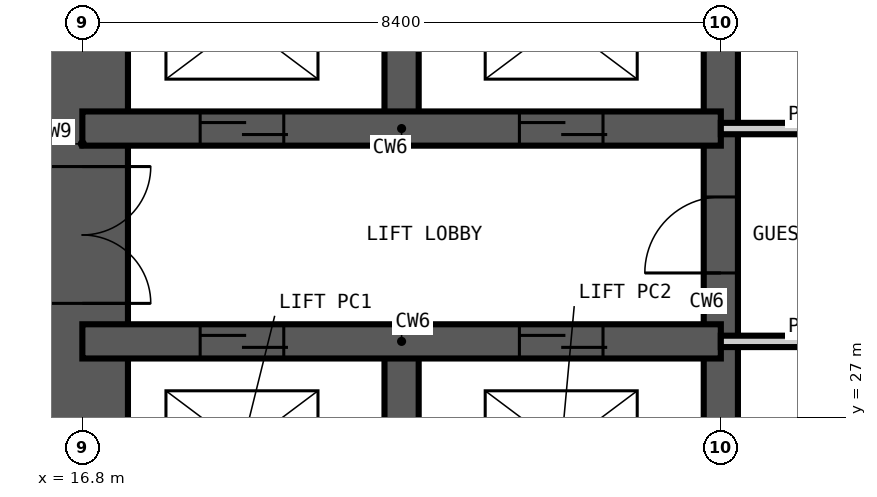
"""IFC4 building model, lengths in metres.
Left out: names, types, materials, properties, quantities, classifications, styles, units other than length and angle.
Written with IfcOpenShell. Run it as: python <this file> out.ifc"""

import sys

from ifc_helpers import new_model, si_unit, direction, frame, frame_2d, origin, place, context, subcontext, project, spatial, rectangle, extrude, element, fill, save


model = new_model("IFC4")
c1 = context("Model", 3, precision=1e-05, world=origin(), true_north=direction((0.0, 1.0)))
c2 = subcontext(c1, "Body", "Model", "MODEL_VIEW")
j1 = project(units=[si_unit("LENGTHUNIT", "METRE"), si_unit("PLANEANGLEUNIT", "RADIAN")], contexts=[c1])
p1 = place(None, origin())
s1 = spatial("IfcSite", under=j1, at=p1, CompositionType="ELEMENT")
p2 = place(p1, origin())
s2 = spatial("IfcBuilding", under=s1, at=p2, CompositionType="ELEMENT")
p3 = place(p2, frame((0.0, 0.0, 97.2)))
s3 = spatial("IfcBuildingStorey", under=s2, at=p3, CompositionType="ELEMENT", Elevation=97.2)
p4 = place(p3, frame((16.8, 41.4, -0.35), z_axis=(0.0, 0.0, 1.0), x_axis=(0.0, -1.0, 0.0)))
e1 = element("IfcWall", 1, at=p4, inside=s3, PredefinedType="SHEAR", context=c2, shape_type="SweptSolid", body=[
    extrude(rectangle(XDim=24.0, YDim=1.2, at=frame_2d((12.0, 0.0))), origin(), (0.0, 0.0, 1.0), 3.6),
])
p5 = place(p4, frame((11.1, 0.0, 0.35)))
e2 = element("IfcOpeningElement", 2, at=p5, cuts=e1, PredefinedType="OPENING", context=c2, shape_type="SweptSolid", body=[
    extrude(rectangle(XDim=1.8, YDim=2.2, at=frame_2d((0.9, 1.1))), frame((0.0, 0.61, 0.0), z_axis=(0.0, -1.0, 0.0), x_axis=(1.0, 0.0, 0.0)), (0.0, 0.0, 1.0), 1.22),
])
p6 = place(p4, frame((19.9, 0.0, 0.35)))
e3 = element("IfcOpeningElement", 3, at=p6, cuts=e1, PredefinedType="OPENING", context=c2, shape_type="SweptSolid", body=[
    extrude(rectangle(XDim=1.0, YDim=2.1, at=frame_2d((0.5, 1.05))), frame((0.0, 0.61, 0.0), z_axis=(0.0, -1.0, 0.0), x_axis=(1.0, 0.0, 0.0)), (0.0, 0.0, 1.0), 1.22),
])
p7 = place(p4, frame((5.2, 0.0, 0.35)))
e4 = element("IfcOpeningElement", 4, at=p7, cuts=e1, PredefinedType="OPENING", context=c2, shape_type="SweptSolid", body=[
    extrude(rectangle(XDim=1.0, YDim=2.1, at=frame_2d((0.5, 1.05))), frame((0.0, 0.61, 0.0), z_axis=(0.0, -1.0, 0.0), x_axis=(1.0, 0.0, 0.0)), (0.0, 0.0, 1.0), 1.22),
])
p8 = place(p3, frame((21.0, 22.4, -0.35), z_axis=(0.0, 0.0, 1.0), x_axis=(0.0, 1.0, 0.0)))
e5 = element("IfcWall", 5, at=p8, inside=s3, PredefinedType="SHEAR", context=c2, shape_type="SweptSolid", body=[
    extrude(rectangle(XDim=5.6, YDim=0.45, at=frame_2d((2.8, 0.0))), origin(), (0.0, 0.0, 1.0), 3.6),
])
p9 = place(p3, frame((21.0, 30.8, -0.35), z_axis=(0.0, 0.0, 1.0), x_axis=(0.0, 1.0, 0.0)))
e6 = element("IfcWall", 6, at=p9, inside=s3, PredefinedType="SHEAR", context=c2, shape_type="SweptSolid", body=[
    extrude(rectangle(XDim=2.8, YDim=0.45, at=frame_2d((1.4, 0.0))), origin(), (0.0, 0.0, 1.0), 3.6),
])
p10 = place(p3, frame((25.2, 16.8, -0.35), z_axis=(0.0, 0.0, 1.0), x_axis=(0.0, 1.0, 0.0)))
e7 = element("IfcWall", 7, at=p10, inside=s3, PredefinedType="SHEAR", context=c2, shape_type="SweptSolid", body=[
    extrude(rectangle(XDim=25.2, YDim=0.45, at=frame_2d((12.6, 0.0))), origin(), (0.0, 0.0, 1.0), 3.6),
])
p11 = place(p10, frame((12.1, 0.0, 0.35)))
e8 = element("IfcOpeningElement", 8, at=p11, cuts=e7, PredefinedType="OPENING", context=c2, shape_type="SweptSolid", body=[
    extrude(rectangle(XDim=1.0, YDim=2.1, at=frame_2d((0.5, 1.05))), frame((0.0, 0.235, 0.0), z_axis=(0.0, -1.0, 0.0), x_axis=(1.0, 0.0, 0.0)), (0.0, 0.0, 1.0), 0.47),
])
p12 = place(p3, frame((16.8, 28.0, -0.35), z_axis=(0.0, 0.0, 1.0), x_axis=(1.0, 0.0, 0.0)))
e9 = element("IfcWall", 9, at=p12, inside=s3, PredefinedType="SHEAR", context=c2, shape_type="SweptSolid", body=[
    extrude(rectangle(XDim=8.4, YDim=0.45, at=frame_2d((4.2, 0.0))), origin(), (0.0, 0.0, 1.0), 3.6),
])
p13 = place(p12, frame((1.55, 0.0, 0.35)))
e10 = element("IfcOpeningElement", 10, at=p13, cuts=e9, PredefinedType="OPENING", context=c2, shape_type="SweptSolid", body=[
    extrude(rectangle(XDim=1.1, YDim=2.2, at=frame_2d((0.55, 1.1))), frame((0.0, 0.235, 0.0), z_axis=(0.0, -1.0, 0.0), x_axis=(1.0, 0.0, 0.0)), (0.0, 0.0, 1.0), 0.47),
])
p14 = place(p12, frame((5.75, 0.0, 0.35)))
e11 = element("IfcOpeningElement", 11, at=p14, cuts=e9, PredefinedType="OPENING", context=c2, shape_type="SweptSolid", body=[
    extrude(rectangle(XDim=1.1, YDim=2.2, at=frame_2d((0.55, 1.1))), frame((0.0, 0.235, 0.0), z_axis=(0.0, -1.0, 0.0), x_axis=(1.0, 0.0, 0.0)), (0.0, 0.0, 1.0), 0.47),
])
p15 = place(p3, frame((16.8, 30.8, -0.35), z_axis=(0.0, 0.0, 1.0), x_axis=(1.0, 0.0, 0.0)))
e12 = element("IfcWall", 12, at=p15, inside=s3, PredefinedType="SHEAR", context=c2, shape_type="SweptSolid", body=[
    extrude(rectangle(XDim=8.4, YDim=0.45, at=frame_2d((4.2, 0.0))), origin(), (0.0, 0.0, 1.0), 3.6),
])
p16 = place(p15, frame((1.55, 0.0, 0.35)))
e13 = element("IfcOpeningElement", 13, at=p16, cuts=e12, PredefinedType="OPENING", context=c2, shape_type="SweptSolid", body=[
    extrude(rectangle(XDim=1.1, YDim=2.2, at=frame_2d((0.55, 1.1))), frame((0.0, 0.235, 0.0), z_axis=(0.0, -1.0, 0.0), x_axis=(1.0, 0.0, 0.0)), (0.0, 0.0, 1.0), 0.47),
])
p17 = place(p15, frame((5.75, 0.0, 0.35)))
e14 = element("IfcOpeningElement", 14, at=p17, cuts=e12, PredefinedType="OPENING", context=c2, shape_type="SweptSolid", body=[
    extrude(rectangle(XDim=1.1, YDim=2.2, at=frame_2d((0.55, 1.1))), frame((0.0, 0.235, 0.0), z_axis=(0.0, -1.0, 0.0), x_axis=(1.0, 0.0, 0.0)), (0.0, 0.0, 1.0), 0.47),
])
p18 = place(p3, frame((25.2, 28.0, 0.0), z_axis=(0.0, 0.0, 1.0), x_axis=(1.0, 0.0, 0.0)))
e15 = element("IfcWall", 15, at=p18, inside=s3, PredefinedType="PARTITIONING", context=c2, shape_type="SweptSolid", body=[
    extrude(rectangle(XDim=4.2, YDim=0.15, at=frame_2d((2.1, 0.0))), origin(), (0.0, 0.0, 1.0), 3.25),
])
p19 = place(p18, frame((1.6, 0.0, 0.0)))
e16 = element("IfcOpeningElement", 16, at=p19, cuts=e15, PredefinedType="OPENING", context=c2, shape_type="SweptSolid", body=[
    extrude(rectangle(XDim=1.0, YDim=2.1, at=frame_2d((0.5, 1.05))), frame((0.0, 0.085, 0.0), z_axis=(0.0, -1.0, 0.0), x_axis=(1.0, 0.0, 0.0)), (0.0, 0.0, 1.0), 0.17),
])
p20 = place(p3, frame((25.2, 30.8, 0.0), z_axis=(0.0, 0.0, 1.0), x_axis=(1.0, 0.0, 0.0)))
e17 = element("IfcWall", 17, at=p20, inside=s3, PredefinedType="PARTITIONING", context=c2, shape_type="SweptSolid", body=[
    extrude(rectangle(XDim=4.2, YDim=0.15, at=frame_2d((2.1, 0.0))), origin(), (0.0, 0.0, 1.0), 3.25),
])
p21 = place(p20, frame((1.6, 0.0, 0.0)))
e18 = element("IfcOpeningElement", 18, at=p21, cuts=e17, PredefinedType="OPENING", context=c2, shape_type="SweptSolid", body=[
    extrude(rectangle(XDim=1.0, YDim=2.1, at=frame_2d((0.5, 1.05))), frame((0.0, 0.085, 0.0), z_axis=(0.0, -1.0, 0.0), x_axis=(1.0, 0.0, 0.0)), (0.0, 0.0, 1.0), 0.17),
])
p22 = place(p13, origin())
e19 = element("IfcDoor", 19, at=p22, inside=s3, OperationType="DOUBLE_DOOR_SLIDING", PredefinedType="DOOR", context=c2, shape_type="SweptSolid", body=[
    extrude(rectangle(XDim=1.1, YDim=2.2, at=frame_2d((0.55, 1.1))), frame((0.0, 0.025, 0.0), z_axis=(0.0, -1.0, 0.0), x_axis=(1.0, 0.0, 0.0)), (0.0, 0.0, 1.0), 0.05),
])
fill(e10, e19)
p23 = place(p14, origin())
e20 = element("IfcDoor", 20, at=p23, inside=s3, OperationType="DOUBLE_DOOR_SLIDING", PredefinedType="DOOR", context=c2, shape_type="SweptSolid", body=[
    extrude(rectangle(XDim=1.1, YDim=2.2, at=frame_2d((0.55, 1.1))), frame((0.0, 0.025, 0.0), z_axis=(0.0, -1.0, 0.0), x_axis=(1.0, 0.0, 0.0)), (0.0, 0.0, 1.0), 0.05),
])
fill(e11, e20)
p24 = place(p16, origin())
e21 = element("IfcDoor", 21, at=p24, inside=s3, OperationType="DOUBLE_DOOR_SLIDING", PredefinedType="DOOR", context=c2, shape_type="SweptSolid", body=[
    extrude(rectangle(XDim=1.1, YDim=2.2, at=frame_2d((0.55, 1.1))), frame((0.0, 0.025, 0.0), z_axis=(0.0, -1.0, 0.0), x_axis=(1.0, 0.0, 0.0)), (0.0, 0.0, 1.0), 0.05),
])
fill(e13, e21)
p25 = place(p17, origin())
e22 = element("IfcDoor", 22, at=p25, inside=s3, OperationType="DOUBLE_DOOR_SLIDING", PredefinedType="DOOR", context=c2, shape_type="SweptSolid", body=[
    extrude(rectangle(XDim=1.1, YDim=2.2, at=frame_2d((0.55, 1.1))), frame((0.0, 0.025, 0.0), z_axis=(0.0, -1.0, 0.0), x_axis=(1.0, 0.0, 0.0)), (0.0, 0.0, 1.0), 0.05),
])
fill(e14, e22)
p26 = place(p5, origin())
e23 = element("IfcDoor", 23, at=p26, inside=s3, OperationType="DOUBLE_DOOR_DOUBLE_SWING", PredefinedType="DOOR", context=c2, shape_type="SweptSolid", body=[
    extrude(rectangle(XDim=1.8, YDim=2.2, at=frame_2d((0.9, 1.1))), frame((0.0, 0.025, 0.0), z_axis=(0.0, -1.0, 0.0), x_axis=(1.0, 0.0, 0.0)), (0.0, 0.0, 1.0), 0.05),
])
fill(e2, e23)
p27 = place(p11, origin())
e24 = element("IfcDoor", 24, at=p27, inside=s3, OperationType="SINGLE_SWING_LEFT", PredefinedType="DOOR", context=c2, shape_type="SweptSolid", body=[
    extrude(rectangle(XDim=1.0, YDim=2.1, at=frame_2d((0.5, 1.05))), frame((0.0, 0.025, 0.0), z_axis=(0.0, -1.0, 0.0), x_axis=(1.0, 0.0, 0.0)), (0.0, 0.0, 1.0), 0.05),
])
fill(e8, e24)
save(model, sys.argv[1])
